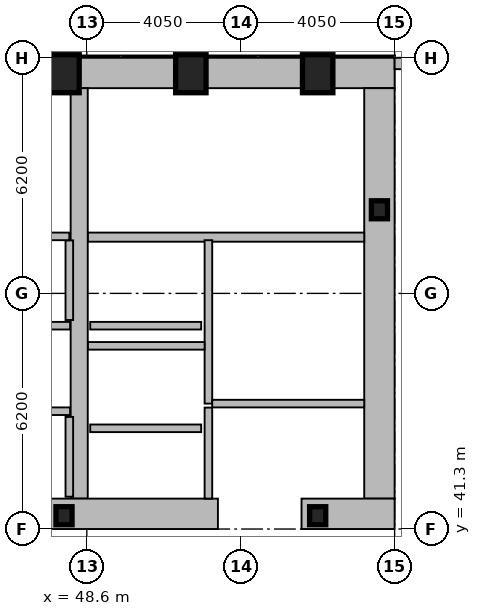
"""IFC4 building model, lengths in metres.
Left out: names, types, materials, properties, quantities, classifications, styles, units other than length and angle.
Written with IfcOpenShell. Run it as: python <this file> out.ifc"""

import sys

from ifc_helpers import new_model, si_unit, direction, frame, frame_2d, origin, origin_2d, place, context, subcontext, project, spatial, rectangle, hollow_rectangle, i_section, extrude, element, fill, save


model = new_model("IFC4")
c1 = context("Model", 3, precision=1e-05, world=origin(), true_north=direction((0.0, 1.0)))
c2 = subcontext(c1, "Body", "Model", "MODEL_VIEW")
j1 = project(units=[si_unit("LENGTHUNIT", "METRE"), si_unit("PLANEANGLEUNIT", "RADIAN")], contexts=[c1])
p1 = place(None, origin())
s1 = spatial("IfcSite", under=j1, at=p1, CompositionType="ELEMENT")
p2 = place(p1, origin())
s2 = spatial("IfcBuilding", under=s1, at=p2, CompositionType="ELEMENT")
p3 = place(p2, origin())
s3 = spatial("IfcBuildingStorey", under=s2, at=p3, CompositionType="ELEMENT", Elevation=0.0)
p4 = place(p3, frame((16.2, 53.3, 0.0), z_axis=(0.0, 0.0, 1.0), x_axis=(1.0, 0.0, 0.0)))
e1 = element("IfcWall", 1, at=p4, inside=s3, PredefinedType="SHEAR", context=c2, shape_type="SweptSolid", body=[
    extrude(rectangle(XDim=40.5, YDim=0.8, at=frame_2d((20.25, 0.0))), origin(), (0.0, 0.0, 1.0), 5.2),
])
p5 = place(p4, frame((2.8, 0.0, 0.0)))
e2 = element("IfcOpeningElement", 2, at=p5, cuts=e1, PredefinedType="OPENING", context=c2, shape_type="SweptSolid", body=[
    extrude(rectangle(XDim=1.8, YDim=2.4, at=frame_2d((0.9, 1.2))), frame((0.0, 0.41, 0.0), z_axis=(0.0, -1.0, 0.0), x_axis=(1.0, 0.0, 0.0)), (0.0, 0.0, 1.0), 0.82),
])
p6 = place(p4, frame((19.3, 0.0, 0.0)))
e3 = element("IfcOpeningElement", 3, at=p6, cuts=e1, PredefinedType="OPENING", context=c2, shape_type="SweptSolid", body=[
    extrude(rectangle(XDim=1.8, YDim=2.4, at=frame_2d((0.9, 1.2))), frame((0.0, 0.41, 0.0), z_axis=(0.0, -1.0, 0.0), x_axis=(1.0, 0.0, 0.0)), (0.0, 0.0, 1.0), 0.82),
])
p7 = place(p4, frame((35.9, 0.0, 0.0)))
e4 = element("IfcOpeningElement", 4, at=p7, cuts=e1, PredefinedType="OPENING", context=c2, shape_type="SweptSolid", body=[
    extrude(rectangle(XDim=1.8, YDim=2.4, at=frame_2d((0.9, 1.2))), frame((0.0, 0.41, 0.0), z_axis=(0.0, -1.0, 0.0), x_axis=(1.0, 0.0, 0.0)), (0.0, 0.0, 1.0), 0.82),
])
p8 = place(p3, frame((56.3, 52.9, 0.0), z_axis=(0.0, 0.0, 1.0), x_axis=(0.0, -1.0, 0.0)))
e5 = element("IfcWall", 5, at=p8, inside=s3, PredefinedType="SHEAR", context=c2, shape_type="SweptSolid", body=[
    extrude(rectangle(XDim=10.8, YDim=0.8, at=frame_2d((5.4, 0.0))), origin(), (0.0, 0.0, 1.0), 5.2),
])
p9 = place(p3, frame((48.4, 42.1, 0.0), z_axis=(0.0, 0.0, 1.0), x_axis=(0.0, 1.0, 0.0)))
e6 = element("IfcWall", 6, at=p9, inside=s3, PredefinedType="SHEAR", context=c2, shape_type="SweptSolid", body=[
    extrude(rectangle(XDim=10.8, YDim=0.45, at=frame_2d((5.4, 0.0))), origin(), (0.0, 0.0, 1.0), 5.2),
])
p10 = place(p3, frame((52.05, 41.7, 0.0), z_axis=(0.0, 0.0, 1.0), x_axis=(-1.0, 0.0, 0.0)))
e7 = element("IfcWall", 7, at=p10, inside=s3, PredefinedType="SHEAR", context=c2, shape_type="SweptSolid", body=[
    extrude(rectangle(XDim=11.3, YDim=0.8, at=frame_2d((5.65, 0.0))), origin(), (0.0, 0.0, 1.0), 5.2),
])
p11 = place(p3, frame((56.7, 41.7, 0.0), z_axis=(0.0, 0.0, 1.0), x_axis=(-1.0, 0.0, 0.0)))
e8 = element("IfcWall", 8, at=p11, inside=s3, PredefinedType="SHEAR", context=c2, shape_type="SweptSolid", body=[
    extrude(rectangle(XDim=2.45, YDim=0.8, at=frame_2d((1.225, 0.0))), origin(), (0.0, 0.0, 1.0), 5.2),
])
p12 = place(p3, frame((48.63, 48.98, 0.0), z_axis=(0.0, 0.0, 1.0), x_axis=(1.0, 0.0, 0.0)))
e9 = element("IfcWall", 9, at=p12, inside=s3, PredefinedType="SHEAR", context=c2, shape_type="SweptSolid", body=[
    extrude(rectangle(XDim=7.27, YDim=0.24, at=frame_2d((3.635, 0.0))), origin(), (0.0, 0.0, 1.0), 5.2),
])
p13 = place(p12, frame((6.0, 0.0, 0.0)))
e10 = element("IfcOpeningElement", 10, at=p13, cuts=e9, PredefinedType="OPENING", context=c2, shape_type="SweptSolid", body=[
    extrude(rectangle(XDim=1.05, YDim=2.15, at=frame_2d((0.525, 1.075))), frame((0.0, 0.13, 0.0), z_axis=(0.0, -1.0, 0.0), x_axis=(1.0, 0.0, 0.0)), (0.0, 0.0, 1.0), 0.26),
])
for number, where, z_axis, x_axis in (
    (11, (48.0, 53.28, 0.0), (0.0, 0.0, 1.0), (1.0, 0.0, 0.0)),
    (12, (51.337, 53.28, 0.0), (0.0, 0.0, 1.0), (1.0, 0.0, 0.0)),
    (13, (54.675, 53.28, 0.0), (0.0, 0.0, 1.0), (1.0, 0.0, 0.0)),
):
    element("IfcColumn", number, at=place(p3, frame(where, z_axis=z_axis, x_axis=x_axis)), inside=s3, PredefinedType="COLUMN", context=c2, shape_type="SweptSolid", body=[
        extrude(hollow_rectangle(XDim=0.8, YDim=1.0, WallThickness=0.055, at=origin_2d()), origin(), (0.0, 0.0, 1.0), 5.4),
    ])
for number, where, z_axis, x_axis in (
    (14, (56.3, 49.7, 0.0), (0.0, 0.0, 1.0), (1.0, 0.0, 0.0)),
    (15, (48.0, 41.65, 0.0), (0.0, 0.0, 1.0), (1.0, 0.0, 0.0)),
    (16, (54.675, 41.65, 0.0), (0.0, 0.0, 1.0), (1.0, 0.0, 0.0)),
):
    element("IfcColumn", number, at=place(p3, frame(where, z_axis=z_axis, x_axis=x_axis)), inside=s3, PredefinedType="COLUMN", context=c2, shape_type="SweptSolid", body=[
        extrude(i_section(OverallWidth=0.424, OverallDepth=0.474, WebThickness=0.048, FlangeThickness=0.077, at=origin_2d()), origin(), (0.0, 0.0, 1.0), 5.4),
    ])
p14 = place(p3, frame((56.7, 53.55, 0.0), z_axis=(0.0, 0.0, 1.0), x_axis=(1.0, 0.0, 0.0)))
e17 = element("IfcWall", 17, at=p14, inside=s3, PredefinedType="SOLIDWALL", context=c2, shape_type="SweptSolid", body=[
    extrude(rectangle(XDim=12.325, YDim=0.3, at=frame_2d((6.163, 0.0))), origin(), (0.0, 0.0, 1.0), 4.54),
])
p15 = place(p14, frame((1.95, 0.0, 0.0)))
e18 = element("IfcOpeningElement", 18, at=p15, cuts=e17, PredefinedType="OPENING", context=c2, shape_type="SweptSolid", body=[
    extrude(rectangle(XDim=1.8, YDim=2.4, at=frame_2d((0.9, 1.2))), frame((0.0, 0.16, 0.0), z_axis=(0.0, -1.0, 0.0), x_axis=(1.0, 0.0, 0.0)), (0.0, 0.0, 1.0), 0.32),
])
p16 = place(p14, frame((7.75, 0.0, 1.0)))
e19 = element("IfcOpeningElement", 19, at=p16, cuts=e17, PredefinedType="OPENING", context=c2, shape_type="SweptSolid", body=[
    extrude(rectangle(XDim=1.2, YDim=2.8, at=frame_2d((0.6, 1.4))), frame((0.0, 0.16, 0.0), z_axis=(0.0, -1.0, 0.0), x_axis=(1.0, 0.0, 0.0)), (0.0, 0.0, 1.0), 0.32),
])
p17 = place(p3, frame((41.68, 44.4, 0.0), z_axis=(0.0, 0.0, 1.0), x_axis=(1.0, 0.0, 0.0)))
e20 = element("IfcWall", 20, at=p17, inside=s3, PredefinedType="PARTITIONING", context=c2, shape_type="SweptSolid", body=[
    extrude(rectangle(XDim=6.48, YDim=0.2, at=frame_2d((3.24, 0.0))), origin(), (0.0, 0.0, 1.0), 5.2),
])
p18 = place(p17, frame((0.58, 0.0, 0.0)))
e21 = element("IfcOpeningElement", 21, at=p18, cuts=e20, PredefinedType="OPENING", context=c2, shape_type="SweptSolid", body=[
    extrude(rectangle(XDim=1.1, YDim=2.18, at=frame_2d((0.55, 1.09))), frame((0.0, 0.11, 0.0), z_axis=(0.0, -1.0, 0.0), x_axis=(1.0, 0.0, 0.0)), (0.0, 0.0, 1.0), 0.22),
])
p19 = place(p17, frame((2.74, 0.0, 0.0)))
e22 = element("IfcOpeningElement", 22, at=p19, cuts=e20, PredefinedType="OPENING", context=c2, shape_type="SweptSolid", body=[
    extrude(rectangle(XDim=1.1, YDim=2.18, at=frame_2d((0.55, 1.09))), frame((0.0, 0.11, 0.0), z_axis=(0.0, -1.0, 0.0), x_axis=(1.0, 0.0, 0.0)), (0.0, 0.0, 1.0), 0.22),
])
p20 = place(p17, frame((4.9, 0.0, 0.0)))
e23 = element("IfcOpeningElement", 23, at=p20, cuts=e20, PredefinedType="OPENING", context=c2, shape_type="SweptSolid", body=[
    extrude(rectangle(XDim=1.1, YDim=2.18, at=frame_2d((0.55, 1.09))), frame((0.0, 0.11, 0.0), z_axis=(0.0, -1.0, 0.0), x_axis=(1.0, 0.0, 0.0)), (0.0, 0.0, 1.0), 0.22),
])
p21 = place(p3, frame((51.61, 43.95, 0.0), z_axis=(0.0, 0.0, 1.0), x_axis=(-1.0, 0.0, 0.0)))
e24 = element("IfcWall", 24, at=p21, inside=s3, PredefinedType="PARTITIONING", context=c2, shape_type="SweptSolid", body=[
    extrude(rectangle(XDim=2.92, YDim=0.2, at=frame_2d((1.46, 0.0))), origin(), (0.0, 0.0, 1.0), 5.2),
])
p22 = place(p21, frame((0.81, 0.0, 0.0)))
e25 = element("IfcOpeningElement", 25, at=p22, cuts=e24, PredefinedType="OPENING", context=c2, shape_type="SweptSolid", body=[
    extrude(rectangle(XDim=1.3, YDim=2.18, at=frame_2d((0.65, 1.09))), frame((0.0, 0.11, 0.0), z_axis=(0.0, -1.0, 0.0), x_axis=(1.0, 0.0, 0.0)), (0.0, 0.0, 1.0), 0.22),
])
p23 = place(p3, frame((51.61, 46.65, 0.0), z_axis=(0.0, 0.0, 1.0), x_axis=(-1.0, 0.0, 0.0)))
e26 = element("IfcWall", 26, at=p23, inside=s3, PredefinedType="PARTITIONING", context=c2, shape_type="SweptSolid", body=[
    extrude(rectangle(XDim=2.92, YDim=0.2, at=frame_2d((1.46, 0.0))), origin(), (0.0, 0.0, 1.0), 5.2),
])
p24 = place(p23, frame((0.86, 0.0, 0.0)))
e27 = element("IfcOpeningElement", 27, at=p24, cuts=e26, PredefinedType="OPENING", context=c2, shape_type="SweptSolid", body=[
    extrude(rectangle(XDim=1.2, YDim=2.18, at=frame_2d((0.6, 1.09))), frame((0.0, 0.11, 0.0), z_axis=(0.0, -1.0, 0.0), x_axis=(1.0, 0.0, 0.0)), (0.0, 0.0, 1.0), 0.22),
])
p25 = place(p3, frame((48.16, 46.65, 0.0), z_axis=(0.0, 0.0, 1.0), x_axis=(-1.0, 0.0, 0.0)))
e28 = element("IfcWall", 28, at=p25, inside=s3, PredefinedType="PARTITIONING", context=c2, shape_type="SweptSolid", body=[
    extrude(rectangle(XDim=6.48, YDim=0.2, at=frame_2d((3.24, 0.0))), origin(), (0.0, 0.0, 1.0), 5.2),
])
p26 = place(p25, frame((4.8, 0.0, 0.0)))
e29 = element("IfcOpeningElement", 29, at=p26, cuts=e28, PredefinedType="OPENING", context=c2, shape_type="SweptSolid", body=[
    extrude(rectangle(XDim=1.1, YDim=2.18, at=frame_2d((0.55, 1.09))), frame((0.0, 0.11, 0.0), z_axis=(0.0, -1.0, 0.0), x_axis=(1.0, 0.0, 0.0)), (0.0, 0.0, 1.0), 0.22),
])
p27 = place(p25, frame((2.64, 0.0, 0.0)))
e30 = element("IfcOpeningElement", 30, at=p27, cuts=e28, PredefinedType="OPENING", context=c2, shape_type="SweptSolid", body=[
    extrude(rectangle(XDim=1.1, YDim=2.18, at=frame_2d((0.55, 1.09))), frame((0.0, 0.11, 0.0), z_axis=(0.0, -1.0, 0.0), x_axis=(1.0, 0.0, 0.0)), (0.0, 0.0, 1.0), 0.22),
])
p28 = place(p25, frame((0.48, 0.0, 0.0)))
e31 = element("IfcOpeningElement", 31, at=p28, cuts=e28, PredefinedType="OPENING", context=c2, shape_type="SweptSolid", body=[
    extrude(rectangle(XDim=1.1, YDim=2.18, at=frame_2d((0.55, 1.09))), frame((0.0, 0.11, 0.0), z_axis=(0.0, -1.0, 0.0), x_axis=(1.0, 0.0, 0.0)), (0.0, 0.0, 1.0), 0.22),
])
p29 = place(p3, frame((51.8, 44.6, 0.0), z_axis=(0.0, 0.0, 1.0), x_axis=(0.0, 1.0, 0.0)))
e32 = element("IfcWall", 32, at=p29, inside=s3, PredefinedType="PARTITIONING", context=c2, shape_type="SweptSolid", body=[
    extrude(rectangle(XDim=4.3, YDim=0.2, at=frame_2d((2.15, 0.0))), origin(), (0.0, 0.0, 1.0), 5.2),
])
p30 = place(p3, frame((51.9, 44.6, 0.0), z_axis=(0.0, 0.0, 1.0), x_axis=(1.0, 0.0, 0.0)))
e33 = element("IfcWall", 33, at=p30, inside=s3, PredefinedType="PARTITIONING", context=c2, shape_type="SweptSolid", body=[
    extrude(rectangle(XDim=4.0, YDim=0.2, at=frame_2d((2.0, 0.0))), origin(), (0.0, 0.0, 1.0), 5.2),
])
p31 = place(p30, frame((1.15, 0.0, 0.0)))
e34 = element("IfcOpeningElement", 34, at=p31, cuts=e33, PredefinedType="OPENING", context=c2, shape_type="SweptSolid", body=[
    extrude(rectangle(XDim=1.05, YDim=2.15, at=frame_2d((0.525, 1.075))), frame((0.0, 0.11, 0.0), z_axis=(0.0, -1.0, 0.0), x_axis=(1.0, 0.0, 0.0)), (0.0, 0.0, 1.0), 0.22),
])
p32 = place(p3, frame((48.63, 46.12, 0.0), z_axis=(0.0, 0.0, 1.0), x_axis=(1.0, 0.0, 0.0)))
e35 = element("IfcWall", 35, at=p32, inside=s3, PredefinedType="PARTITIONING", context=c2, shape_type="SweptSolid", body=[
    extrude(rectangle(XDim=3.07, YDim=0.2, at=frame_2d((1.535, 0.0))), origin(), (0.0, 0.0, 1.0), 5.2),
])
p33 = place(p3, frame((51.8, 42.1, 0.0), z_axis=(0.0, 0.0, 1.0), x_axis=(0.0, 1.0, 0.0)))
e36 = element("IfcWall", 36, at=p33, inside=s3, PredefinedType="PARTITIONING", context=c2, shape_type="SweptSolid", body=[
    extrude(rectangle(XDim=2.395, YDim=0.2, at=frame_2d((1.198, 0.0))), origin(), (0.0, 0.0, 1.0), 5.2),
])
p34 = place(p33, frame((0.38, 0.0, 0.0)))
e37 = element("IfcOpeningElement", 37, at=p34, cuts=e36, PredefinedType="OPENING", context=c2, shape_type="SweptSolid", body=[
    extrude(rectangle(XDim=1.05, YDim=2.15, at=frame_2d((0.525, 1.075))), frame((0.0, 0.11, 0.0), z_axis=(0.0, -1.0, 0.0), x_axis=(1.0, 0.0, 0.0)), (0.0, 0.0, 1.0), 0.22),
])
p35 = place(p3, frame((48.14, 46.8, 0.0), z_axis=(0.0, 0.0, 1.0), x_axis=(0.0, 1.0, 0.0)))
e38 = element("IfcWall", 38, at=p35, inside=s3, PredefinedType="PARTITIONING", context=c2, shape_type="SweptSolid", body=[
    extrude(rectangle(XDim=2.095, YDim=0.2, at=frame_2d((1.047, 0.0))), origin(), (0.0, 0.0, 1.0), 5.2),
])
p36 = place(p3, frame((48.14, 42.15, 0.0), z_axis=(0.0, 0.0, 1.0), x_axis=(0.0, 1.0, 0.0)))
e39 = element("IfcWall", 39, at=p36, inside=s3, PredefinedType="PARTITIONING", context=c2, shape_type="SweptSolid", body=[
    extrude(rectangle(XDim=2.1, YDim=0.2, at=frame_2d((1.05, 0.0))), origin(), (0.0, 0.0, 1.0), 5.2),
])
p37 = place(p3, frame((40.58, 52.86, 0.0), z_axis=(0.0, 0.0, 1.0), x_axis=(1.0, 0.0, 0.0)))
e40 = element("IfcWall", 40, at=p37, inside=s3, PredefinedType="PARTITIONING", context=c2, shape_type="SweptSolid", body=[
    extrude(rectangle(XDim=7.56, YDim=0.12, at=frame_2d((3.78, 0.0))), origin(), (0.0, 0.0, 1.0), 5.2),
])
p38 = place(p3, frame((40.58, 49.0, 0.0), z_axis=(0.0, 0.0, 1.0), x_axis=(1.0, 0.0, 0.0)))
e41 = element("IfcWall", 41, at=p38, inside=s3, PredefinedType="PARTITIONING", context=c2, shape_type="SweptSolid", body=[
    extrude(rectangle(XDim=7.56, YDim=0.2, at=frame_2d((3.78, 0.0))), origin(), (0.0, 0.0, 1.0), 5.2),
])
p39 = place(p38, frame((0.16, 0.0, 0.0)))
e42 = element("IfcOpeningElement", 42, at=p39, cuts=e41, PredefinedType="OPENING", context=c2, shape_type="SweptSolid", body=[
    extrude(rectangle(XDim=0.95, YDim=2.1, at=frame_2d((0.475, 1.05))), frame((0.0, 0.11, 0.0), z_axis=(0.0, -1.0, 0.0), x_axis=(1.0, 0.0, 0.0)), (0.0, 0.0, 1.0), 0.22),
])
p40 = place(p7, origin())
e43 = element("IfcDoor", 43, at=p40, inside=s3, OperationType="DOUBLE_DOOR_SINGLE_SWING", PredefinedType="DOOR", context=c2, shape_type="SweptSolid", body=[
    extrude(rectangle(XDim=1.8, YDim=2.4, at=frame_2d((0.9, 1.2))), frame((0.0, 0.025, 0.0), z_axis=(0.0, -1.0, 0.0), x_axis=(1.0, 0.0, 0.0)), (0.0, 0.0, 1.0), 0.05),
])
fill(e4, e43)
p41 = place(p13, origin())
e44 = element("IfcDoor", 44, at=p41, inside=s3, OperationType="SINGLE_SWING_RIGHT", PredefinedType="DOOR", context=c2, shape_type="SweptSolid", body=[
    extrude(rectangle(XDim=1.05, YDim=2.15, at=frame_2d((0.525, 1.075))), frame((0.0, 0.025, 0.0), z_axis=(0.0, -1.0, 0.0), x_axis=(1.0, 0.0, 0.0)), (0.0, 0.0, 1.0), 0.05),
])
fill(e10, e44)
p42 = place(p22, origin())
e45 = element("IfcDoor", 45, at=p42, inside=s3, OperationType="SLIDING_TO_LEFT", PredefinedType="DOOR", context=c2, shape_type="SweptSolid", body=[
    extrude(rectangle(XDim=1.3, YDim=2.18, at=frame_2d((0.65, 1.09))), frame((0.0, 0.025, 0.0), z_axis=(0.0, -1.0, 0.0), x_axis=(1.0, 0.0, 0.0)), (0.0, 0.0, 1.0), 0.05),
])
fill(e25, e45)
p43 = place(p24, origin())
e46 = element("IfcDoor", 46, at=p43, inside=s3, OperationType="SLIDING_TO_LEFT", PredefinedType="DOOR", context=c2, shape_type="SweptSolid", body=[
    extrude(rectangle(XDim=1.2, YDim=2.18, at=frame_2d((0.6, 1.09))), frame((0.0, 0.025, 0.0), z_axis=(0.0, -1.0, 0.0), x_axis=(1.0, 0.0, 0.0)), (0.0, 0.0, 1.0), 0.05),
])
fill(e27, e46)
p44 = place(p31, origin())
e47 = element("IfcDoor", 47, at=p44, inside=s3, OperationType="SINGLE_SWING_RIGHT", PredefinedType="DOOR", context=c2, shape_type="SweptSolid", body=[
    extrude(rectangle(XDim=1.05, YDim=2.15, at=frame_2d((0.525, 1.075))), frame((0.0, 0.025, 0.0), z_axis=(0.0, -1.0, 0.0), x_axis=(1.0, 0.0, 0.0)), (0.0, 0.0, 1.0), 0.05),
])
fill(e34, e47)
p45 = place(p34, origin())
e48 = element("IfcDoor", 48, at=p45, inside=s3, OperationType="SINGLE_SWING_LEFT", PredefinedType="DOOR", context=c2, shape_type="SweptSolid", body=[
    extrude(rectangle(XDim=1.05, YDim=2.15, at=frame_2d((0.525, 1.075))), frame((0.0, 0.025, 0.0), z_axis=(0.0, -1.0, 0.0), x_axis=(1.0, 0.0, 0.0)), (0.0, 0.0, 1.0), 0.05),
])
fill(e37, e48)
save(model, sys.argv[1])
